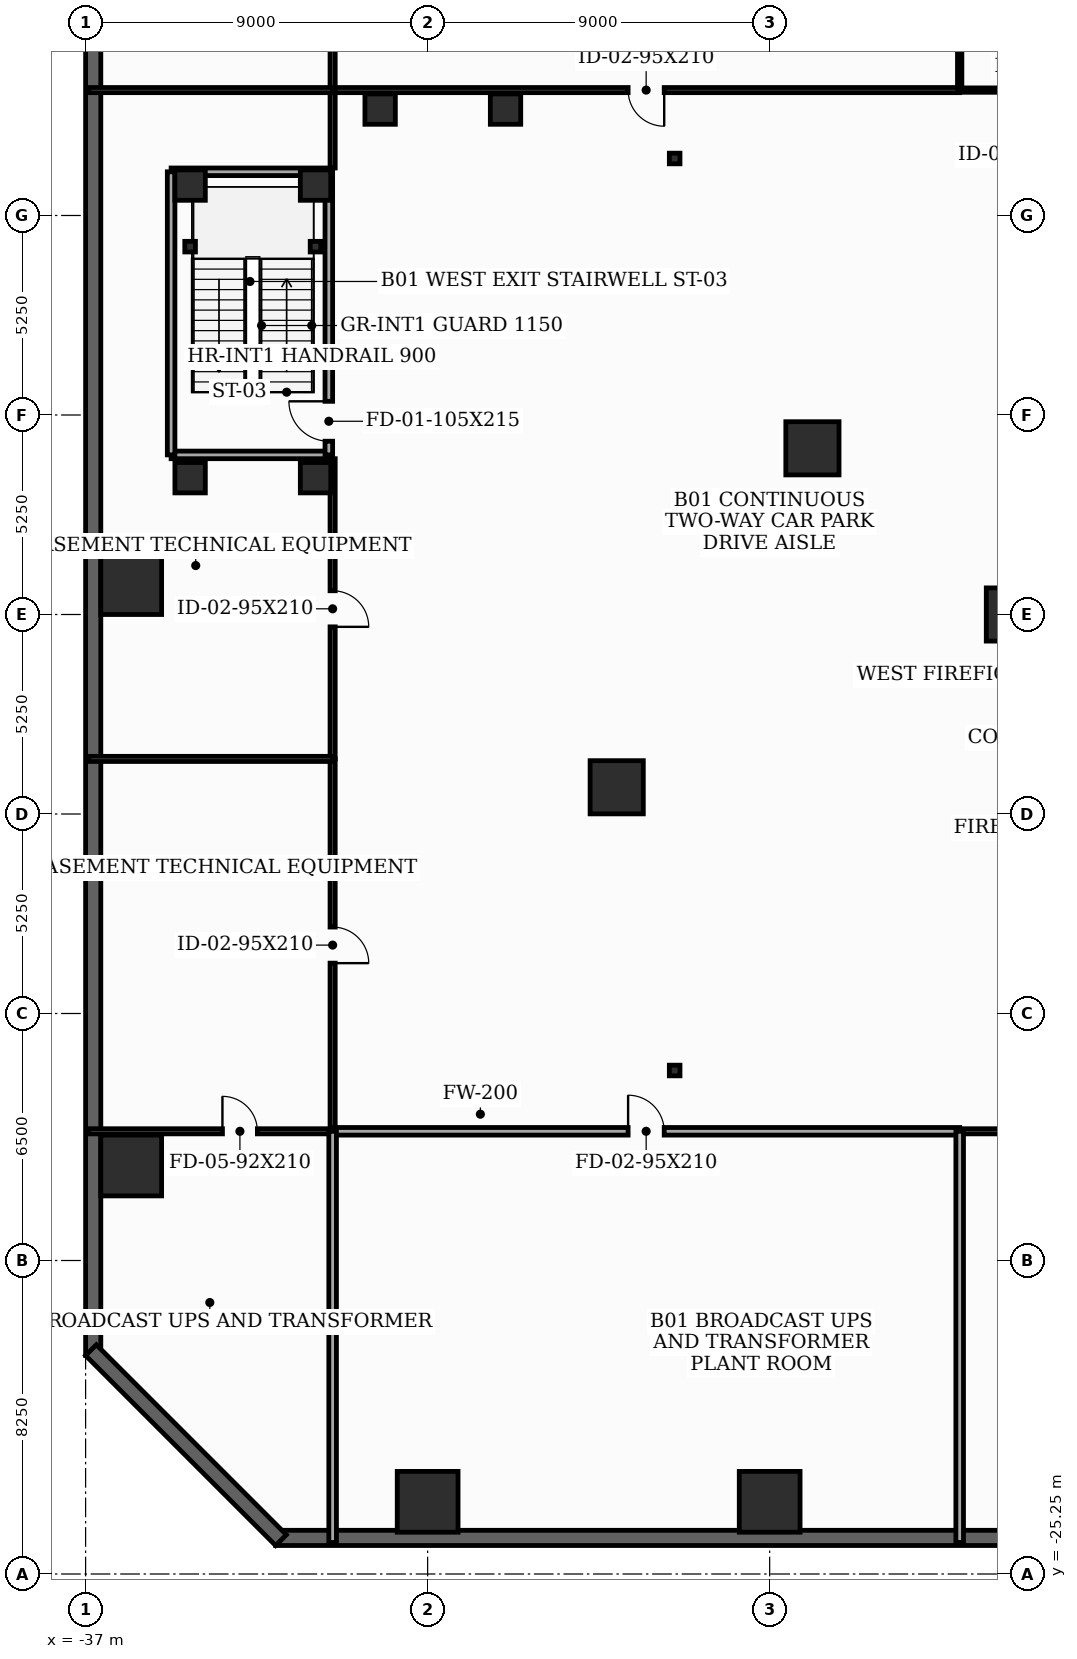
"""IFC4 building model, lengths in metres.
Left out: names, types, materials, properties, quantities, classifications, styles, units other than length and angle.
Written with IfcOpenShell. Run it as: python <this file> out.ifc"""

import sys

from ifc_helpers import new_model, si_unit, direction, frame, frame_2d, origin, origin_2d, place, context, subcontext, project, spatial, rectangle, i_section, extrude, element, fill, save


model = new_model("IFC4")
c1 = context("Model", 3, precision=1e-05, world=origin(), true_north=direction((0.0, 1.0)))
c2 = subcontext(c1, "Body", "Model", "MODEL_VIEW")
j1 = project(units=[si_unit("LENGTHUNIT", "METRE"), si_unit("PLANEANGLEUNIT", "RADIAN")], contexts=[c1])
p1 = place(None, origin())
s1 = spatial("IfcSite", under=j1, at=p1, CompositionType="ELEMENT")
p2 = place(p1, origin())
s2 = spatial("IfcBuilding", under=s1, at=p2, CompositionType="ELEMENT")
p3 = place(p2, frame((0.0, 0.0, -4.8)))
s3 = spatial("IfcBuildingStorey", under=s2, at=p3, CompositionType="ELEMENT", Elevation=-4.8)
p4 = place(p3, frame((-12.6, 0.0, 0.0), z_axis=(0.0, 0.0, 1.0), x_axis=(1.0, 0.0, 0.0)))
e1 = element("IfcColumn", 1, at=p4, inside=s3, PredefinedType="COLUMN", context=c2, shape_type="SweptSolid", body=[
    extrude(rectangle(XDim=1.4, YDim=1.4, at=origin_2d()), origin(), (0.0, 0.0, 1.0), 4.8),
])
for number, where, z_axis, x_axis in (
    (2, (-28.0, -23.35, 0.0), (0.0, 0.0, 1.0), (1.0, 0.0, 0.0)),
    (3, (-19.0, -23.35, 0.0), (0.0, 0.0, 1.0), (1.0, 0.0, 0.0)),
    (4, (-35.8, 0.8, 0.0), (0.0, 0.0, 1.0), (1.0, 0.0, 0.0)),
    (5, (-35.8, -14.5, 0.0), (0.0, 0.0, 1.0), (1.0, 0.0, 0.0)),
):
    element("IfcColumn", number, at=place(p3, frame(where, z_axis=z_axis, x_axis=x_axis)), inside=s3, PredefinedType="COLUMN", context=c2, shape_type="SweptSolid", body=[
        extrude(rectangle(XDim=1.6, YDim=1.6, at=origin_2d()), origin(), (0.0, 0.0, 1.0), 4.8),
    ])
for number, where, z_axis, x_axis in (
    (6, (-17.875, 4.373, 0.0), (0.0, 0.0, 1.0), (1.0, 0.0, 0.0)),
    (7, (-23.025, -4.547, 0.0), (0.0, 0.0, 1.0), (1.0, 0.0, 0.0)),
):
    element("IfcColumn", number, at=place(p3, frame(where, z_axis=z_axis, x_axis=x_axis)), inside=s3, PredefinedType="COLUMN", context=c2, shape_type="SweptSolid", body=[
        extrude(rectangle(XDim=1.4, YDim=1.4, at=origin_2d()), origin(), (0.0, 0.0, 1.0), 4.8),
    ])
for number, where, z_axis, x_axis in (
    (8, (-21.5, -12.0, 0.0), (0.0, 0.0, 1.0), (1.0, 0.0, 0.0)),
    (9, (-21.5, 12.0, 0.0), (0.0, 0.0, 1.0), (1.0, 0.0, 0.0)),
):
    element("IfcColumn", number, at=place(p3, frame(where, z_axis=z_axis, x_axis=x_axis)), inside=s3, PredefinedType="PILASTER", context=c2, shape_type="SweptSolid", body=[
        extrude(i_section(OverallWidth=0.28, OverallDepth=0.28, WebThickness=0.01, FlangeThickness=0.018, at=origin_2d()), origin(), (0.0, 0.0, 1.0), 4.8),
    ])
for number, where, z_axis, x_axis in (
    (10, (-34.25, 3.6, 0.0), (0.0, 0.0, 1.0), (1.0, 0.0, 0.0)),
    (11, (-30.95, 3.6, 0.0), (0.0, 0.0, 1.0), (1.0, 0.0, 0.0)),
    (12, (-30.95, 11.3, 0.0), (0.0, 0.0, 1.0), (1.0, 0.0, 0.0)),
    (13, (-34.25, 11.3, 0.0), (0.0, 0.0, 1.0), (1.0, 0.0, 0.0)),
):
    element("IfcColumn", number, at=place(p3, frame(where, z_axis=z_axis, x_axis=x_axis)), inside=s3, PredefinedType="COLUMN", context=c2, shape_type="SweptSolid", body=[
        extrude(rectangle(XDim=0.8, YDim=0.8, at=origin_2d()), origin(), (0.0, 0.0, 1.0), 4.8),
    ])
for number, where, z_axis, x_axis in (
    (14, (-34.25, 9.68, 0.0), (0.0, 0.0, 1.0), (1.0, 0.0, 0.0)),
    (15, (-30.95, 9.68, 0.0), (0.0, 0.0, 1.0), (1.0, 0.0, 0.0)),
):
    element("IfcColumn", number, at=place(p3, frame(where, z_axis=z_axis, x_axis=x_axis)), inside=s3, PredefinedType="PILASTER", context=c2, shape_type="SweptSolid", body=[
        extrude(i_section(OverallWidth=0.28, OverallDepth=0.28, WebThickness=0.01, FlangeThickness=0.018, at=origin_2d()), origin(), (0.0, 0.0, 1.0), 4.8),
    ])
for number, where, z_axis, x_axis in (
    (16, (-29.25, 13.3, 0.0), (0.0, 0.0, 1.0), (1.0, 0.0, 0.0)),
    (17, (-25.95, 13.3, 0.0), (0.0, 0.0, 1.0), (1.0, 0.0, 0.0)),
):
    element("IfcColumn", number, at=place(p3, frame(where, z_axis=z_axis, x_axis=x_axis)), inside=s3, PredefinedType="COLUMN", context=c2, shape_type="SweptSolid", body=[
        extrude(rectangle(XDim=0.8, YDim=0.8, at=origin_2d()), origin(), (0.0, 0.0, 1.0), 4.8),
    ])
p5 = place(p3, frame((-32.0, -24.3, 0.0), z_axis=(0.0, 0.0, 1.0), x_axis=(1.0, 0.0, 0.0)))
e18 = element("IfcWall", 18, at=p5, inside=s3, PredefinedType="USERDEFINED", context=c2, shape_type="SweptSolid", body=[
    extrude(rectangle(XDim=64.0, YDim=0.4, at=frame_2d((32.0, 0.0))), origin(), (0.0, 0.0, 1.0), 4.55),
])
p6 = place(p3, frame((-36.8, 28.5, 0.0), z_axis=(0.0, 0.0, 1.0), x_axis=(0.0, -1.0, 0.0)))
e19 = element("IfcWall", 19, at=p6, inside=s3, PredefinedType="USERDEFINED", context=c2, shape_type="SweptSolid", body=[
    extrude(rectangle(XDim=48.0, YDim=0.4, at=frame_2d((24.0, 0.0))), origin(), (0.0, 0.0, 1.0), 4.55),
])
p7 = place(p3, frame((-36.859, -19.359, 0.0), z_axis=(0.0, 0.0, 1.0), x_axis=(0.707106781187, -0.707106781187, 0.0)))
e20 = element("IfcWall", 20, at=p7, inside=s3, PredefinedType="USERDEFINED", context=c2, shape_type="SweptSolid", body=[
    extrude(rectangle(XDim=7.071, YDim=0.4, at=frame_2d((3.536, 0.0))), origin(), (0.0, 0.0, 1.0), 4.55),
])
p8 = place(p3, frame((-34.75, 4.2, 0.0), z_axis=(0.0, 0.0, 1.0), x_axis=(1.0, 0.0, 0.0)))
e21 = element("IfcWall", 21, at=p8, inside=s3, PredefinedType="SOLIDWALL", context=c2, shape_type="SweptSolid", body=[
    extrude(rectangle(XDim=4.15, YDim=0.2, at=frame_2d((2.075, 0.0))), origin(), (0.0, 0.0, 1.0), 3.935),
])
p9 = place(p3, frame((-30.6, 4.2, 0.0), z_axis=(0.0, 0.0, 1.0), x_axis=(0.0, 1.0, 0.0)))
e22 = element("IfcWall", 22, at=p9, inside=s3, PredefinedType="SOLIDWALL", context=c2, shape_type="SweptSolid", body=[
    extrude(rectangle(XDim=7.45, YDim=0.2, at=frame_2d((3.725, 0.0))), origin(), (0.0, 0.0, 1.0), 3.935),
])
p10 = place(p9, frame((0.36, 0.0, 0.0)))
e23 = element("IfcOpeningElement", 23, at=p10, cuts=e22, PredefinedType="OPENING", context=c2, shape_type="SweptSolid", body=[
    extrude(rectangle(XDim=1.05, YDim=2.15, at=frame_2d((0.525, 1.075))), frame((0.0, 0.11, 0.0), z_axis=(0.0, -1.0, 0.0), x_axis=(1.0, 0.0, 0.0)), (0.0, 0.0, 1.0), 0.22),
])
p11 = place(p3, frame((-30.6, 11.65, 0.0), z_axis=(0.0, 0.0, 1.0), x_axis=(-1.0, 0.0, 0.0)))
e24 = element("IfcWall", 24, at=p11, inside=s3, PredefinedType="SOLIDWALL", context=c2, shape_type="SweptSolid", body=[
    extrude(rectangle(XDim=4.15, YDim=0.2, at=frame_2d((2.075, 0.0))), origin(), (0.0, 0.0, 1.0), 4.55),
])
p12 = place(p3, frame((-34.75, 11.65, 0.0), z_axis=(0.0, 0.0, 1.0), x_axis=(0.0, -1.0, 0.0)))
e25 = element("IfcWall", 25, at=p12, inside=s3, PredefinedType="SOLIDWALL", context=c2, shape_type="SweptSolid", body=[
    extrude(rectangle(XDim=7.45, YDim=0.2, at=frame_2d((3.725, 0.0))), origin(), (0.0, 0.0, 1.0), 4.55),
])
p13 = place(p3, frame((-30.5, -3.8, 0.0), z_axis=(0.0, 0.0, 1.0), x_axis=(0.0, -1.0, 0.0)))
e26 = element("IfcWall", 26, at=p13, inside=s3, PredefinedType="PARTITIONING", context=c2, shape_type="SweptSolid", body=[
    extrude(rectangle(XDim=9.8, YDim=0.135, at=frame_2d((4.9, 0.0))), origin(), (0.0, 0.0, 1.0), 3.335),
])
p14 = place(p13, frame((4.425, 0.0, 0.0)))
e27 = element("IfcOpeningElement", 27, at=p14, cuts=e26, PredefinedType="OPENING", context=c2, shape_type="SweptSolid", body=[
    extrude(rectangle(XDim=0.95, YDim=2.1, at=frame_2d((0.475, 1.05))), frame((0.0, 0.077, 0.0), z_axis=(0.0, -1.0, 0.0), x_axis=(1.0, 0.0, 0.0)), (0.0, 0.0, 1.0), 0.155),
])
p15 = place(p3, frame((-30.5, -13.6, 0.0), z_axis=(0.0, 0.0, 1.0), x_axis=(1.0, 0.0, 0.0)))
e28 = element("IfcWall", 28, at=p15, inside=s3, PredefinedType="SOLIDWALL", context=c2, shape_type="SweptSolid", body=[
    extrude(rectangle(XDim=16.5, YDim=0.2, at=frame_2d((8.25, 0.0))), origin(), (0.0, 0.0, 1.0), 3.335),
])
p16 = place(p15, frame((7.775, 0.0, 0.0)))
e29 = element("IfcOpeningElement", 29, at=p16, cuts=e28, PredefinedType="OPENING", context=c2, shape_type="SweptSolid", body=[
    extrude(rectangle(XDim=0.95, YDim=2.1, at=frame_2d((0.475, 1.05))), frame((0.0, 0.11, 0.0), z_axis=(0.0, -1.0, 0.0), x_axis=(1.0, 0.0, 0.0)), (0.0, 0.0, 1.0), 0.22),
])
p17 = place(p3, frame((-14.0, -13.6, 0.0), z_axis=(0.0, 0.0, 1.0), x_axis=(1.0, 0.0, 0.0)))
e30 = element("IfcWall", 30, at=p17, inside=s3, PredefinedType="PARTITIONING", context=c2, shape_type="SweptSolid", body=[
    extrude(rectangle(XDim=28.0, YDim=0.135, at=frame_2d((14.0, 0.0))), origin(), (0.0, 0.0, 1.0), 3.335),
])
p18 = place(p17, frame((10.165, 0.0, 0.0)))
e31 = element("IfcOpeningElement", 31, at=p18, cuts=e30, PredefinedType="OPENING", context=c2, shape_type="SweptSolid", body=[
    extrude(rectangle(XDim=0.95, YDim=2.1, at=frame_2d((0.475, 1.05))), frame((0.0, 0.077, 0.0), z_axis=(0.0, -1.0, 0.0), x_axis=(1.0, 0.0, 0.0)), (0.0, 0.0, 1.0), 0.155),
])
p19 = place(p3, frame((-10.5, 13.8, 0.0), z_axis=(0.0, 0.0, 1.0), x_axis=(-1.0, 0.0, 0.0)))
e32 = element("IfcWall", 32, at=p19, inside=s3, PredefinedType="PARTITIONING", context=c2, shape_type="SweptSolid", body=[
    extrude(rectangle(XDim=3.5, YDim=0.115, at=frame_2d((1.75, 0.0))), origin(), (0.0, 0.0, 1.0), 4.55),
])
p20 = place(p19, frame((1.29, 0.0, 0.0)))
e33 = element("IfcOpeningElement", 33, at=p20, cuts=e32, PredefinedType="OPENING", context=c2, shape_type="SweptSolid", body=[
    extrude(rectangle(XDim=0.92, YDim=2.1, at=frame_2d((0.46, 1.05))), frame((0.0, 0.067, 0.0), z_axis=(0.0, -1.0, 0.0), x_axis=(1.0, 0.0, 0.0)), (0.0, 0.0, 1.0), 0.135),
])
p21 = place(p3, frame((-14.0, 13.8, 0.0), z_axis=(0.0, 0.0, 1.0), x_axis=(-1.0, 0.0, 0.0)))
e34 = element("IfcWall", 34, at=p21, inside=s3, PredefinedType="PARTITIONING", context=c2, shape_type="SweptSolid", body=[
    extrude(rectangle(XDim=16.5, YDim=0.135, at=frame_2d((8.25, 0.0))), origin(), (0.0, 0.0, 1.0), 3.135),
])
p22 = place(p21, frame((7.775, 0.0, 0.0)))
e35 = element("IfcOpeningElement", 35, at=p22, cuts=e34, PredefinedType="OPENING", context=c2, shape_type="SweptSolid", body=[
    extrude(rectangle(XDim=0.95, YDim=2.1, at=frame_2d((0.475, 1.05))), frame((0.0, 0.077, 0.0), z_axis=(0.0, -1.0, 0.0), x_axis=(1.0, 0.0, 0.0)), (0.0, 0.0, 1.0), 0.155),
])
p23 = place(p3, frame((-30.5, 4.1, 0.0), z_axis=(0.0, 0.0, 1.0), x_axis=(0.0, -1.0, 0.0)))
e36 = element("IfcWall", 36, at=p23, inside=s3, PredefinedType="PARTITIONING", context=c2, shape_type="SweptSolid", body=[
    extrude(rectangle(XDim=7.9, YDim=0.135, at=frame_2d((3.95, 0.0))), origin(), (0.0, 0.0, 1.0), 3.335),
])
p24 = place(p23, frame((3.475, 0.0, 0.0)))
e37 = element("IfcOpeningElement", 37, at=p24, cuts=e36, PredefinedType="OPENING", context=c2, shape_type="SweptSolid", body=[
    extrude(rectangle(XDim=0.95, YDim=2.1, at=frame_2d((0.475, 1.05))), frame((0.0, 0.077, 0.0), z_axis=(0.0, -1.0, 0.0), x_axis=(1.0, 0.0, 0.0)), (0.0, 0.0, 1.0), 0.155),
])
p25 = place(p3, frame((-30.5, 13.8, 0.0), z_axis=(0.0, 0.0, 1.0), x_axis=(0.0, -1.0, 0.0)))
e38 = element("IfcWall", 38, at=p25, inside=s3, PredefinedType="PARTITIONING", context=c2, shape_type="SweptSolid", body=[
    extrude(rectangle(XDim=2.05, YDim=0.135, at=frame_2d((1.025, 0.0))), origin(), (0.0, 0.0, 1.0), 4.55),
])
p26 = place(p3, frame((-36.92, -13.6, 0.0), z_axis=(0.0, 0.0, 1.0), x_axis=(1.0, 0.0, 0.0)))
e39 = element("IfcWall", 39, at=p26, inside=s3, PredefinedType="PARTITIONING", context=c2, shape_type="SweptSolid", body=[
    extrude(rectangle(XDim=6.42, YDim=0.135, at=frame_2d((3.21, 0.0))), origin(), (0.0, 0.0, 1.0), 3.335),
])
p27 = place(p26, frame((3.521, 0.0, 0.0)))
e40 = element("IfcOpeningElement", 40, at=p27, cuts=e39, PredefinedType="OPENING", context=c2, shape_type="SweptSolid", body=[
    extrude(rectangle(XDim=0.92, YDim=2.1, at=frame_2d((0.46, 1.05))), frame((0.0, 0.077, 0.0), z_axis=(0.0, -1.0, 0.0), x_axis=(1.0, 0.0, 0.0)), (0.0, 0.0, 1.0), 0.155),
])
p28 = place(p3, frame((-30.5, -3.8, 0.0), z_axis=(0.0, 0.0, 1.0), x_axis=(-1.0, 0.0, 0.0)))
e41 = element("IfcWall", 41, at=p28, inside=s3, PredefinedType="PARTITIONING", context=c2, shape_type="SweptSolid", body=[
    extrude(rectangle(XDim=6.42, YDim=0.135, at=frame_2d((3.21, 0.0))), origin(), (0.0, 0.0, 1.0), 3.835),
])
p29 = place(p3, frame((-30.5, -24.42, 0.0), z_axis=(0.0, 0.0, 1.0), x_axis=(0.0, 1.0, 0.0)))
e42 = element("IfcWall", 42, at=p29, inside=s3, PredefinedType="SOLIDWALL", context=c2, shape_type="SweptSolid", body=[
    extrude(rectangle(XDim=10.82, YDim=0.2, at=frame_2d((5.41, 0.0))), origin(), (0.0, 0.0, 1.0), 3.835),
])
p30 = place(p3, frame((-14.0, -24.42, 0.0), z_axis=(0.0, 0.0, 1.0), x_axis=(0.0, 1.0, 0.0)))
e43 = element("IfcWall", 43, at=p30, inside=s3, PredefinedType="SOLIDWALL", context=c2, shape_type="SweptSolid", body=[
    extrude(rectangle(XDim=10.82, YDim=0.2, at=frame_2d((5.41, 0.0))), origin(), (0.0, 0.0, 1.0), 3.335),
])
p31 = place(p3, frame((-14.0, 18.2, 0.0), z_axis=(0.0, 0.0, 1.0), x_axis=(0.0, -1.0, 0.0)))
e44 = element("IfcWall", 44, at=p31, inside=s3, PredefinedType="PARTITIONING", context=c2, shape_type="SweptSolid", body=[
    extrude(rectangle(XDim=4.4, YDim=0.115, at=frame_2d((2.2, 0.0))), origin(), (0.0, 0.0, 1.0), 3.835),
])
p32 = place(p3, frame((-30.5, 33.42, 0.0), z_axis=(0.0, 0.0, 1.0), x_axis=(0.0, -1.0, 0.0)))
e45 = element("IfcWall", 45, at=p32, inside=s3, PredefinedType="PARTITIONING", context=c2, shape_type="SweptSolid", body=[
    extrude(rectangle(XDim=19.62, YDim=0.135, at=frame_2d((9.81, 0.0))), origin(), (0.0, 0.0, 1.0), 3.335),
])
p33 = place(p32, frame((9.35, 0.0, 0.0)))
e46 = element("IfcOpeningElement", 46, at=p33, cuts=e45, PredefinedType="OPENING", context=c2, shape_type="SweptSolid", body=[
    extrude(rectangle(XDim=0.92, YDim=2.1, at=frame_2d((0.46, 1.05))), frame((0.0, 0.077, 0.0), z_axis=(0.0, -1.0, 0.0), x_axis=(1.0, 0.0, 0.0)), (0.0, 0.0, 1.0), 0.155),
])
p34 = place(p3, frame((-36.92, 13.8, 0.0), z_axis=(0.0, 0.0, 1.0), x_axis=(1.0, 0.0, 0.0)))
e47 = element("IfcWall", 47, at=p34, inside=s3, PredefinedType="PARTITIONING", context=c2, shape_type="SweptSolid", body=[
    extrude(rectangle(XDim=6.42, YDim=0.135, at=frame_2d((3.21, 0.0))), origin(), (0.0, 0.0, 1.0), 3.835),
])
p35 = place(p10, origin())
e48 = element("IfcDoor", 48, at=p35, inside=s3, OperationType="SINGLE_SWING_RIGHT", PredefinedType="DOOR", context=c2, shape_type="SweptSolid", body=[
    extrude(rectangle(XDim=1.05, YDim=2.15, at=frame_2d((0.525, 1.075))), frame((0.0, 0.025, 0.0), z_axis=(0.0, -1.0, 0.0), x_axis=(1.0, 0.0, 0.0)), (0.0, 0.0, 1.0), 0.05),
])
fill(e23, e48)
p36 = place(p14, origin())
e49 = element("IfcDoor", 49, at=p36, inside=s3, OperationType="SINGLE_SWING_RIGHT", PredefinedType="DOOR", context=c2, shape_type="SweptSolid", body=[
    extrude(rectangle(XDim=0.95, YDim=2.1, at=frame_2d((0.475, 1.05))), frame((0.0, 0.025, 0.0), z_axis=(0.0, -1.0, 0.0), x_axis=(1.0, 0.0, 0.0)), (0.0, 0.0, 1.0), 0.05),
])
fill(e27, e49)
p37 = place(p16, origin())
e50 = element("IfcDoor", 50, at=p37, inside=s3, OperationType="SINGLE_SWING_LEFT", PredefinedType="DOOR", context=c2, shape_type="SweptSolid", body=[
    extrude(rectangle(XDim=0.95, YDim=2.1, at=frame_2d((0.475, 1.05))), frame((0.0, 0.025, 0.0), z_axis=(0.0, -1.0, 0.0), x_axis=(1.0, 0.0, 0.0)), (0.0, 0.0, 1.0), 0.05),
])
fill(e29, e50)
p38 = place(p22, origin())
e51 = element("IfcDoor", 51, at=p38, inside=s3, OperationType="SINGLE_SWING_LEFT", PredefinedType="DOOR", context=c2, shape_type="SweptSolid", body=[
    extrude(rectangle(XDim=0.95, YDim=2.1, at=frame_2d((0.475, 1.05))), frame((0.0, 0.025, 0.0), z_axis=(0.0, -1.0, 0.0), x_axis=(1.0, 0.0, 0.0)), (0.0, 0.0, 1.0), 0.05),
])
fill(e35, e51)
p39 = place(p24, origin())
e52 = element("IfcDoor", 52, at=p39, inside=s3, OperationType="SINGLE_SWING_RIGHT", PredefinedType="DOOR", context=c2, shape_type="SweptSolid", body=[
    extrude(rectangle(XDim=0.95, YDim=2.1, at=frame_2d((0.475, 1.05))), frame((0.0, 0.025, 0.0), z_axis=(0.0, -1.0, 0.0), x_axis=(1.0, 0.0, 0.0)), (0.0, 0.0, 1.0), 0.05),
])
fill(e37, e52)
p40 = place(p27, origin())
e53 = element("IfcDoor", 53, at=p40, inside=s3, OperationType="SINGLE_SWING_LEFT", PredefinedType="DOOR", context=c2, shape_type="SweptSolid", body=[
    extrude(rectangle(XDim=0.92, YDim=2.1, at=frame_2d((0.46, 1.05))), frame((0.0, 0.025, 0.0), z_axis=(0.0, -1.0, 0.0), x_axis=(1.0, 0.0, 0.0)), (0.0, 0.0, 1.0), 0.05),
])
fill(e40, e53)
save(model, sys.argv[1])
